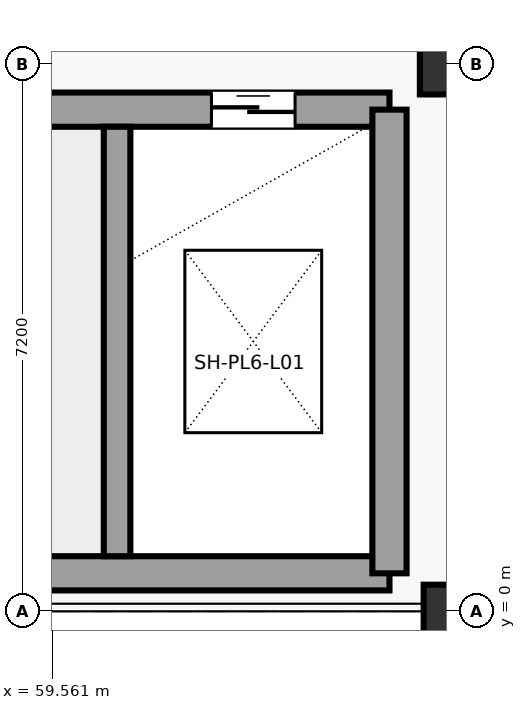
"""IFC4 building model, lengths in metres.
Left out: names, types, materials, properties, quantities, classifications, styles, units other than length and angle.
Written with IfcOpenShell. Run it as: python <this file> out.ifc"""

import sys

from ifc_helpers import new_model, si_unit, direction, frame, frame_2d, origin, origin_2d, place, context, subcontext, project, spatial, rectangle, circle, extrude, element, fill, save


model = new_model("IFC4")
c1 = context("Model", 3, precision=1e-05, world=origin(), true_north=direction((0.0, 1.0)))
c2 = subcontext(c1, "Body", "Model", "MODEL_VIEW")
j1 = project(units=[si_unit("LENGTHUNIT", "METRE"), si_unit("PLANEANGLEUNIT", "RADIAN")], contexts=[c1])
p1 = place(None, origin())
s1 = spatial("IfcSite", under=j1, at=p1, CompositionType="ELEMENT")
p2 = place(p1, origin())
s2 = spatial("IfcBuilding", under=s1, at=p2, CompositionType="ELEMENT")
p3 = place(p2, frame((0.0, 0.0, 5.4)))
s3 = spatial("IfcBuildingStorey", under=s2, at=p3, CompositionType="ELEMENT", Elevation=5.4)
p4 = place(p3, frame((64.8, 0.0, 0.0), z_axis=(0.0, 0.0, 1.0), x_axis=(1.0, 0.0, 0.0)))
e1 = element("IfcColumn", 1, at=p4, inside=s3, PredefinedType="COLUMN", context=c2, shape_type="SweptSolid", body=[
    extrude(rectangle(XDim=0.7, YDim=0.7, at=origin_2d()), origin(), (0.0, 0.0, 1.0), 4.2),
])
p5 = place(p3, frame((64.8, 7.2, 0.0), z_axis=(0.0, 0.0, 1.0), x_axis=(1.0, 0.0, 0.0)))
e2 = element("IfcColumn", 2, at=p5, inside=s3, PredefinedType="COLUMN", context=c2, shape_type="SweptSolid", body=[
    extrude(circle(Radius=0.4, at=origin_2d()), origin(), (0.0, 0.0, 1.0), 4.2),
])
p6 = place(p3, frame((51.2, 0.5, 0.0), z_axis=(0.0, 0.0, 1.0), x_axis=(1.0, 0.0, 0.0)))
e3 = element("IfcWall", 3, at=p6, inside=s3, PredefinedType="SHEAR", context=c2, shape_type="SweptSolid", body=[
    extrude(rectangle(XDim=12.8, YDim=0.45, at=frame_2d((6.4, 0.0))), origin(), (0.0, 0.0, 1.0), 3.92),
])
p7 = place(p3, frame((51.2, 6.6, 0.0), z_axis=(0.0, 0.0, 1.0), x_axis=(1.0, 0.0, 0.0)))
e4 = element("IfcWall", 4, at=p7, inside=s3, PredefinedType="SHEAR", context=c2, shape_type="SweptSolid", body=[
    extrude(rectangle(XDim=12.8, YDim=0.45, at=frame_2d((6.4, 0.0))), origin(), (0.0, 0.0, 1.0), 3.92),
])
p8 = place(p7, frame((0.55, 0.0, 0.0)))
e5 = element("IfcOpeningElement", 5, at=p8, cuts=e4, PredefinedType="OPENING", context=c2, shape_type="SweptSolid", body=[
    extrude(rectangle(XDim=1.2, YDim=2.25, at=frame_2d((0.6, 1.125))), frame((0.0, 0.235, 0.0), z_axis=(0.0, -1.0, 0.0), x_axis=(1.0, 0.0, 0.0)), (0.0, 0.0, 1.0), 0.47),
])
p9 = place(p7, frame((10.458, 0.0, 0.0)))
e6 = element("IfcOpeningElement", 6, at=p9, cuts=e4, PredefinedType="OPENING", context=c2, shape_type="SweptSolid", body=[
    extrude(rectangle(XDim=1.1, YDim=2.2, at=frame_2d((0.55, 1.1))), frame((0.0, 0.235, 0.0), z_axis=(0.0, -1.0, 0.0), x_axis=(1.0, 0.0, 0.0)), (0.0, 0.0, 1.0), 0.47),
])
p10 = place(p3, frame((64.0, 0.5, 0.0), z_axis=(0.0, 0.0, 1.0), x_axis=(0.0, 1.0, 0.0)))
e7 = element("IfcWall", 7, at=p10, inside=s3, PredefinedType="SHEAR", context=c2, shape_type="SweptSolid", body=[
    extrude(rectangle(XDim=6.1, YDim=0.45, at=frame_2d((3.05, 0.0))), origin(), (0.0, 0.0, 1.0), 3.92),
])
p11 = place(p3, frame((60.416, 0.725, 0.0), z_axis=(0.0, 0.0, 1.0), x_axis=(0.0, 1.0, 0.0)))
e8 = element("IfcWall", 8, at=p11, inside=s3, PredefinedType="SHEAR", context=c2, shape_type="SweptSolid", body=[
    extrude(rectangle(XDim=5.65, YDim=0.35, at=frame_2d((2.825, 0.0))), origin(), (0.0, 0.0, 1.0), 3.92),
])
p12 = place(p9, origin())
e9 = element("IfcDoor", 9, at=p12, inside=s3, OperationType="SLIDING_TO_RIGHT", PredefinedType="DOOR", context=c2, shape_type="SweptSolid", body=[
    extrude(rectangle(XDim=1.1, YDim=2.2, at=frame_2d((0.55, 1.1))), frame((0.0, 0.025, 0.0), z_axis=(0.0, -1.0, 0.0), x_axis=(1.0, 0.0, 0.0)), (0.0, 0.0, 1.0), 0.05),
])
fill(e6, e9)
save(model, sys.argv[1])
